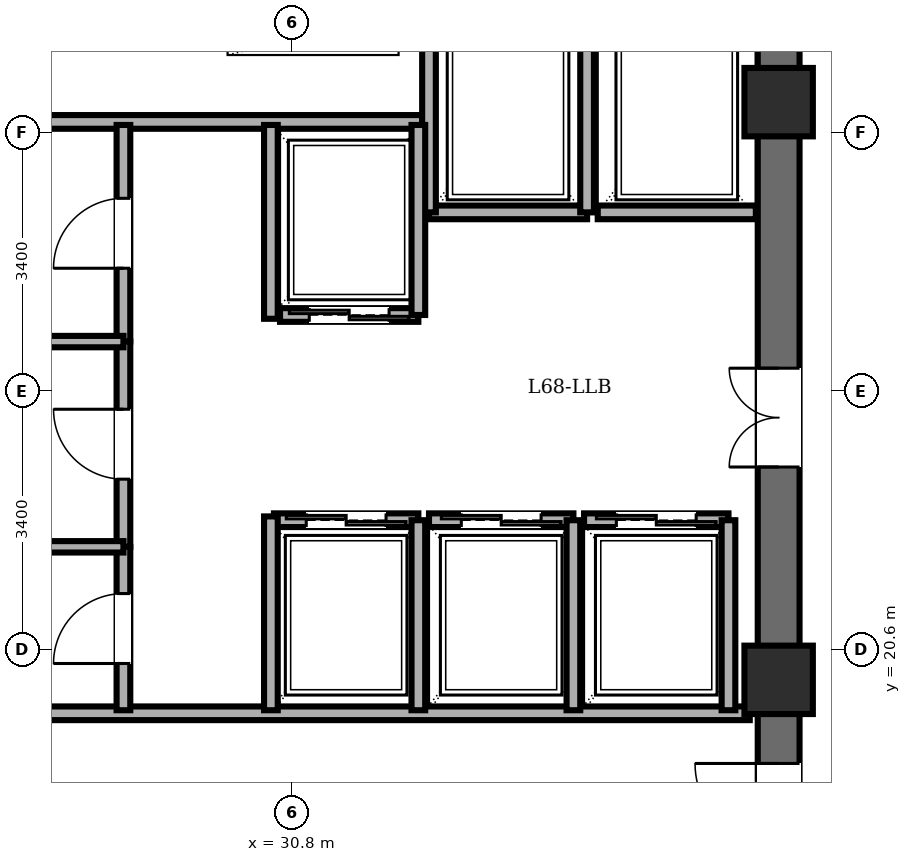
"""IFC4 building model, lengths in metres.
Left out: names, types, materials, properties, quantities, classifications, styles, units other than length and angle.
Written with IfcOpenShell. Run it as: python <this file> out.ifc"""

import sys

from ifc_helpers import new_model, si_unit, direction, frame, frame_2d, origin, origin_2d, place, context, subcontext, project, spatial, rectangle, extrude, element, fill, save


model = new_model("IFC4")
c1 = context("Model", 3, precision=1e-05, world=origin(), true_north=direction((0.0, 1.0)))
c2 = subcontext(c1, "Body", "Model", "MODEL_VIEW")
j1 = project(units=[si_unit("LENGTHUNIT", "METRE"), si_unit("PLANEANGLEUNIT", "RADIAN")], contexts=[c1])
p1 = place(None, origin())
s1 = spatial("IfcSite", under=j1, at=p1, CompositionType="ELEMENT")
p2 = place(p1, origin())
s2 = spatial("IfcBuilding", under=s1, at=p2, CompositionType="ELEMENT")
p3 = place(p2, frame((0.0, 0.0, 262.45)))
s3 = spatial("IfcBuildingStorey", under=s2, at=p3, CompositionType="ELEMENT", Elevation=262.45)
for number, where, z_axis, x_axis in (
    (1, (37.2, 20.2, 0.0), (0.0, 0.0, 1.0), (1.0, 0.0, 0.0)),
    (2, (37.2, 27.8, 0.0), (0.0, 0.0, 1.0), (1.0, 0.0, 0.0)),
):
    element("IfcColumn", number, at=place(p3, frame(where, z_axis=z_axis, x_axis=x_axis)), inside=s3, PredefinedType="COLUMN", context=c2, shape_type="SweptSolid", body=[
        extrude(rectangle(XDim=0.9, YDim=0.9, at=origin_2d()), origin(), (0.0, 0.0, 1.0), 3.65),
    ])
p4 = place(p3, frame((37.2, 14.4, 0.0), z_axis=(0.0, 0.0, 1.0), x_axis=(0.0, 1.0, 0.0)))
e3 = element("IfcWall", 3, at=p4, inside=s3, PredefinedType="SHEAR", context=c2, shape_type="SweptSolid", body=[
    extrude(rectangle(XDim=19.2, YDim=0.55, at=frame_2d((9.6, 0.0))), origin(), (0.0, 0.0, 1.0), 3.45),
])
p5 = place(p4, frame((15.8, 0.0, 0.0)))
e4 = element("IfcOpeningElement", 4, at=p5, cuts=e3, PredefinedType="OPENING", context=c2, shape_type="SweptSolid", body=[
    extrude(rectangle(XDim=1.15, YDim=2.15, at=frame_2d((0.575, 1.075))), frame((0.0, 0.285, 0.0), z_axis=(0.0, -1.0, 0.0), x_axis=(1.0, 0.0, 0.0)), (0.0, 0.0, 1.0), 0.57),
])
p6 = place(p4, frame((3.6, 0.0, 0.0)))
e5 = element("IfcOpeningElement", 5, at=p6, cuts=e3, PredefinedType="OPENING", context=c2, shape_type="SweptSolid", body=[
    extrude(rectangle(XDim=1.1, YDim=2.15, at=frame_2d((0.55, 1.075))), frame((0.0, 0.285, 0.0), z_axis=(0.0, -1.0, 0.0), x_axis=(1.0, 0.0, 0.0)), (0.0, 0.0, 1.0), 0.57),
])
p7 = place(p4, frame((8.6, 0.0, 0.0)))
e6 = element("IfcOpeningElement", 6, at=p7, cuts=e3, PredefinedType="OPENING", context=c2, shape_type="SweptSolid", body=[
    extrude(rectangle(XDim=1.3, YDim=2.2, at=frame_2d((0.65, 1.1))), frame((0.0, 0.285, 0.0), z_axis=(0.0, -1.0, 0.0), x_axis=(1.0, 0.0, 0.0)), (0.0, 0.0, 1.0), 0.57),
])
p8 = place(p3, frame((21.95, 27.54, 0.0), z_axis=(0.0, 0.0, 1.0), x_axis=(1.0, 0.0, 0.0)))
e7 = element("IfcWall", 7, at=p8, inside=s3, PredefinedType="PARTITIONING", context=c2, shape_type="SweptSolid", body=[
    extrude(rectangle(XDim=10.56, YDim=0.18, at=frame_2d((5.28, 0.0))), origin(), (0.0, 0.0, 1.0), 3.45),
])
p9 = place(p3, frame((21.95, 19.76, 0.0), z_axis=(0.0, 0.0, 1.0), x_axis=(1.0, 0.0, 0.0)))
e8 = element("IfcWall", 8, at=p9, inside=s3, PredefinedType="PARTITIONING", context=c2, shape_type="SweptSolid", body=[
    extrude(rectangle(XDim=14.87, YDim=0.18, at=frame_2d((7.435, 0.0))), origin(), (0.0, 0.0, 1.0), 3.45),
])
p10 = place(p3, frame((34.68, 26.35, 0.0), z_axis=(0.0, 0.0, 1.0), x_axis=(-1.0, 0.0, 0.0)))
e9 = element("IfcWall", 9, at=p10, inside=s3, PredefinedType="PARTITIONING", context=c2, shape_type="SweptSolid", body=[
    extrude(rectangle(XDim=2.08, YDim=0.18, at=frame_2d((1.04, 0.0))), origin(), (0.0, 0.0, 1.0), 3.45),
])
for number, where, z_axis, x_axis in (
    (10, (34.68, 26.35, 0.0), (0.0, 0.0, 1.0), (0.0, 1.0, 0.0)),
    (11, (32.6, 29.08, 0.0), (0.0, 0.0, 1.0), (0.0, -1.0, 0.0)),
):
    element("IfcWall", number, at=place(p3, frame(where, z_axis=z_axis, x_axis=x_axis)), inside=s3, PredefinedType="PARTITIONING", context=c2, shape_type="SweptSolid", body=[
        extrude(rectangle(XDim=2.73, YDim=0.18, at=frame_2d((1.365, 0.0))), origin(), (0.0, 0.0, 1.0), 3.45),
    ])
p11 = place(p3, frame((36.9, 26.35, 0.0), z_axis=(0.0, 0.0, 1.0), x_axis=(-1.0, 0.0, 0.0)))
e12 = element("IfcWall", 12, at=p11, inside=s3, PredefinedType="PARTITIONING", context=c2, shape_type="SweptSolid", body=[
    extrude(rectangle(XDim=2.08, YDim=0.18, at=frame_2d((1.04, 0.0))), origin(), (0.0, 0.0, 1.0), 3.45),
])
p12 = place(p3, frame((32.46, 25.0, 0.0), z_axis=(0.0, 0.0, 1.0), x_axis=(-1.0, 0.0, 0.0)))
e13 = element("IfcWall", 13, at=p12, inside=s3, PredefinedType="PARTITIONING", context=c2, shape_type="SweptSolid", body=[
    extrude(rectangle(XDim=1.82, YDim=0.18, at=frame_2d((0.91, 0.0))), origin(), (0.0, 0.0, 1.0), 3.45),
])
p13 = place(p12, frame((0.385, 0.0, 0.0)))
e14 = element("IfcOpeningElement", 14, at=p13, cuts=e13, PredefinedType="OPENING", context=c2, shape_type="SweptSolid", body=[
    extrude(rectangle(XDim=1.05, YDim=2.2, at=frame_2d((0.525, 1.1))), frame((0.0, 0.1, 0.0), z_axis=(0.0, -1.0, 0.0), x_axis=(1.0, 0.0, 0.0)), (0.0, 0.0, 1.0), 0.2),
])
p14 = place(p3, frame((32.46, 25.0, 0.0), z_axis=(0.0, 0.0, 1.0), x_axis=(0.0, 1.0, 0.0)))
e15 = element("IfcWall", 15, at=p14, inside=s3, PredefinedType="PARTITIONING", context=c2, shape_type="SweptSolid", body=[
    extrude(rectangle(XDim=2.5, YDim=0.18, at=frame_2d((1.25, 0.0))), origin(), (0.0, 0.0, 1.0), 3.45),
])
p15 = place(p3, frame((30.56, 22.3, 0.0), z_axis=(0.0, 0.0, 1.0), x_axis=(1.0, 0.0, 0.0)))
e16 = element("IfcWall", 16, at=p15, inside=s3, PredefinedType="PARTITIONING", context=c2, shape_type="SweptSolid", body=[
    extrude(rectangle(XDim=1.9, YDim=0.18, at=frame_2d((0.95, 0.0))), origin(), (0.0, 0.0, 1.0), 3.45),
])
p16 = place(p15, frame((0.425, 0.0, 0.0)))
e17 = element("IfcOpeningElement", 17, at=p16, cuts=e16, PredefinedType="OPENING", context=c2, shape_type="SweptSolid", body=[
    extrude(rectangle(XDim=1.05, YDim=2.2, at=frame_2d((0.525, 1.1))), frame((0.0, 0.1, 0.0), z_axis=(0.0, -1.0, 0.0), x_axis=(1.0, 0.0, 0.0)), (0.0, 0.0, 1.0), 0.2),
])
p17 = place(p3, frame((32.46, 19.8, 0.0), z_axis=(0.0, 0.0, 1.0), x_axis=(0.0, 1.0, 0.0)))
e18 = element("IfcWall", 18, at=p17, inside=s3, PredefinedType="PARTITIONING", context=c2, shape_type="SweptSolid", body=[
    extrude(rectangle(XDim=2.5, YDim=0.18, at=frame_2d((1.25, 0.0))), origin(), (0.0, 0.0, 1.0), 3.45),
])
p18 = place(p3, frame((32.6, 22.3, 0.0), z_axis=(0.0, 0.0, 1.0), x_axis=(1.0, 0.0, 0.0)))
e19 = element("IfcWall", 19, at=p18, inside=s3, PredefinedType="PARTITIONING", context=c2, shape_type="SweptSolid", body=[
    extrude(rectangle(XDim=1.9, YDim=0.18, at=frame_2d((0.95, 0.0))), origin(), (0.0, 0.0, 1.0), 3.45),
])
p19 = place(p18, frame((0.425, 0.0, 0.0)))
e20 = element("IfcOpeningElement", 20, at=p19, cuts=e19, PredefinedType="OPENING", context=c2, shape_type="SweptSolid", body=[
    extrude(rectangle(XDim=1.05, YDim=2.2, at=frame_2d((0.525, 1.1))), frame((0.0, 0.1, 0.0), z_axis=(0.0, -1.0, 0.0), x_axis=(1.0, 0.0, 0.0)), (0.0, 0.0, 1.0), 0.2),
])
p20 = place(p3, frame((34.5, 19.8, 0.0), z_axis=(0.0, 0.0, 1.0), x_axis=(0.0, 1.0, 0.0)))
e21 = element("IfcWall", 21, at=p20, inside=s3, PredefinedType="PARTITIONING", context=c2, shape_type="SweptSolid", body=[
    extrude(rectangle(XDim=2.5, YDim=0.18, at=frame_2d((1.25, 0.0))), origin(), (0.0, 0.0, 1.0), 3.45),
])
p21 = place(p3, frame((34.64, 22.3, 0.0), z_axis=(0.0, 0.0, 1.0), x_axis=(1.0, 0.0, 0.0)))
e22 = element("IfcWall", 22, at=p21, inside=s3, PredefinedType="PARTITIONING", context=c2, shape_type="SweptSolid", body=[
    extrude(rectangle(XDim=1.9, YDim=0.18, at=frame_2d((0.95, 0.0))), origin(), (0.0, 0.0, 1.0), 3.45),
])
p22 = place(p21, frame((0.425, 0.0, 0.0)))
e23 = element("IfcOpeningElement", 23, at=p22, cuts=e22, PredefinedType="OPENING", context=c2, shape_type="SweptSolid", body=[
    extrude(rectangle(XDim=1.05, YDim=2.2, at=frame_2d((0.525, 1.1))), frame((0.0, 0.1, 0.0), z_axis=(0.0, -1.0, 0.0), x_axis=(1.0, 0.0, 0.0)), (0.0, 0.0, 1.0), 0.2),
])
p23 = place(p3, frame((36.54, 19.8, 0.0), z_axis=(0.0, 0.0, 1.0), x_axis=(0.0, 1.0, 0.0)))
e24 = element("IfcWall", 24, at=p23, inside=s3, PredefinedType="PARTITIONING", context=c2, shape_type="SweptSolid", body=[
    extrude(rectangle(XDim=2.5, YDim=0.18, at=frame_2d((1.25, 0.0))), origin(), (0.0, 0.0, 1.0), 3.45),
])
for number, where, z_axis, x_axis in (
    (25, (30.52, 24.95, 0.0), (0.0, 0.0, 1.0), (0.0, 1.0, 0.0)),
    (26, (30.52, 19.8, 0.0), (0.0, 0.0, 1.0), (0.0, 1.0, 0.0)),
):
    element("IfcWall", number, at=place(p3, frame(where, z_axis=z_axis, x_axis=x_axis)), inside=s3, PredefinedType="PARTITIONING", context=c2, shape_type="SweptSolid", body=[
        extrude(rectangle(XDim=2.55, YDim=0.18, at=frame_2d((1.275, 0.0))), origin(), (0.0, 0.0, 1.0), 3.45),
    ])
p24 = place(p3, frame((28.58, 24.65, 0.0), z_axis=(0.0, 0.0, 1.0), x_axis=(0.0, 1.0, 0.0)))
e27 = element("IfcWall", 27, at=p24, inside=s3, PredefinedType="PARTITIONING", context=c2, shape_type="SweptSolid", body=[
    extrude(rectangle(XDim=2.85, YDim=0.18, at=frame_2d((1.425, 0.0))), origin(), (0.0, 0.0, 1.0), 3.45),
])
p25 = place(p24, frame((0.965, 0.0, 0.0)))
e28 = element("IfcOpeningElement", 28, at=p25, cuts=e27, PredefinedType="OPENING", context=c2, shape_type="SweptSolid", body=[
    extrude(rectangle(XDim=0.92, YDim=2.1, at=frame_2d((0.46, 1.05))), frame((0.0, 0.1, 0.0), z_axis=(0.0, -1.0, 0.0), x_axis=(1.0, 0.0, 0.0)), (0.0, 0.0, 1.0), 0.2),
])
p26 = place(p3, frame((28.58, 21.95, 0.0), z_axis=(0.0, 0.0, 1.0), x_axis=(0.0, 1.0, 0.0)))
e29 = element("IfcWall", 29, at=p26, inside=s3, PredefinedType="PARTITIONING", context=c2, shape_type="SweptSolid", body=[
    extrude(rectangle(XDim=2.7, YDim=0.18, at=frame_2d((1.35, 0.0))), origin(), (0.0, 0.0, 1.0), 3.45),
])
p27 = place(p26, frame((0.89, 0.0, 0.0)))
e30 = element("IfcOpeningElement", 30, at=p27, cuts=e29, PredefinedType="OPENING", context=c2, shape_type="SweptSolid", body=[
    extrude(rectangle(XDim=0.92, YDim=2.1, at=frame_2d((0.46, 1.05))), frame((0.0, 0.1, 0.0), z_axis=(0.0, -1.0, 0.0), x_axis=(1.0, 0.0, 0.0)), (0.0, 0.0, 1.0), 0.2),
])
p28 = place(p3, frame((28.58, 19.8, 0.0), z_axis=(0.0, 0.0, 1.0), x_axis=(0.0, 1.0, 0.0)))
e31 = element("IfcWall", 31, at=p28, inside=s3, PredefinedType="PARTITIONING", context=c2, shape_type="SweptSolid", body=[
    extrude(rectangle(XDim=2.15, YDim=0.18, at=frame_2d((1.075, 0.0))), origin(), (0.0, 0.0, 1.0), 3.45),
])
p29 = place(p28, frame((0.615, 0.0, 0.0)))
e32 = element("IfcOpeningElement", 32, at=p29, cuts=e31, PredefinedType="OPENING", context=c2, shape_type="SweptSolid", body=[
    extrude(rectangle(XDim=0.92, YDim=2.1, at=frame_2d((0.46, 1.05))), frame((0.0, 0.1, 0.0), z_axis=(0.0, -1.0, 0.0), x_axis=(1.0, 0.0, 0.0)), (0.0, 0.0, 1.0), 0.2),
])
for number, where, z_axis, x_axis in (
    (33, (21.95, 24.65, 0.0), (0.0, 0.0, 1.0), (1.0, 0.0, 0.0)),
    (34, (21.95, 21.95, 0.0), (0.0, 0.0, 1.0), (1.0, 0.0, 0.0)),
):
    element("IfcWall", number, at=place(p3, frame(where, z_axis=z_axis, x_axis=x_axis)), inside=s3, PredefinedType="PARTITIONING", context=c2, shape_type="SweptSolid", body=[
        extrude(rectangle(XDim=6.63, YDim=0.15, at=frame_2d((3.315, 0.0))), origin(), (0.0, 0.0, 1.0), 3.45),
    ])
p30 = place(p6, origin())
e35 = element("IfcDoor", 35, at=p30, inside=s3, OperationType="SINGLE_SWING_RIGHT", PredefinedType="DOOR", context=c2, shape_type="SweptSolid", body=[
    extrude(rectangle(XDim=1.1, YDim=2.15, at=frame_2d((0.55, 1.075))), frame((0.0, 0.025, 0.0), z_axis=(0.0, -1.0, 0.0), x_axis=(1.0, 0.0, 0.0)), (0.0, 0.0, 1.0), 0.05),
])
fill(e5, e35)
p31 = place(p13, origin())
e36 = element("IfcDoor", 36, at=p31, inside=s3, OperationType="DOUBLE_DOOR_SLIDING", PredefinedType="DOOR", context=c2, shape_type="SweptSolid", body=[
    extrude(rectangle(XDim=1.05, YDim=2.2, at=frame_2d((0.525, 1.1))), frame((0.0, 0.025, 0.0), z_axis=(0.0, -1.0, 0.0), x_axis=(1.0, 0.0, 0.0)), (0.0, 0.0, 1.0), 0.05),
])
fill(e14, e36)
p32 = place(p16, origin())
e37 = element("IfcDoor", 37, at=p32, inside=s3, OperationType="DOUBLE_DOOR_SLIDING", PredefinedType="DOOR", context=c2, shape_type="SweptSolid", body=[
    extrude(rectangle(XDim=1.05, YDim=2.2, at=frame_2d((0.525, 1.1))), frame((0.0, 0.025, 0.0), z_axis=(0.0, -1.0, 0.0), x_axis=(1.0, 0.0, 0.0)), (0.0, 0.0, 1.0), 0.05),
])
fill(e17, e37)
p33 = place(p19, origin())
e38 = element("IfcDoor", 38, at=p33, inside=s3, OperationType="DOUBLE_DOOR_SLIDING", PredefinedType="DOOR", context=c2, shape_type="SweptSolid", body=[
    extrude(rectangle(XDim=1.05, YDim=2.2, at=frame_2d((0.525, 1.1))), frame((0.0, 0.025, 0.0), z_axis=(0.0, -1.0, 0.0), x_axis=(1.0, 0.0, 0.0)), (0.0, 0.0, 1.0), 0.05),
])
fill(e20, e38)
p34 = place(p22, origin())
e39 = element("IfcDoor", 39, at=p34, inside=s3, OperationType="DOUBLE_DOOR_SLIDING", PredefinedType="DOOR", context=c2, shape_type="SweptSolid", body=[
    extrude(rectangle(XDim=1.05, YDim=2.2, at=frame_2d((0.525, 1.1))), frame((0.0, 0.025, 0.0), z_axis=(0.0, -1.0, 0.0), x_axis=(1.0, 0.0, 0.0)), (0.0, 0.0, 1.0), 0.05),
])
fill(e23, e39)
p35 = place(p25, origin())
e40 = element("IfcDoor", 40, at=p35, inside=s3, OperationType="SINGLE_SWING_LEFT", PredefinedType="DOOR", context=c2, shape_type="SweptSolid", body=[
    extrude(rectangle(XDim=0.92, YDim=2.1, at=frame_2d((0.46, 1.05))), frame((0.0, 0.025, 0.0), z_axis=(0.0, -1.0, 0.0), x_axis=(1.0, 0.0, 0.0)), (0.0, 0.0, 1.0), 0.05),
])
fill(e28, e40)
p36 = place(p27, origin())
e41 = element("IfcDoor", 41, at=p36, inside=s3, OperationType="SINGLE_SWING_RIGHT", PredefinedType="DOOR", context=c2, shape_type="SweptSolid", body=[
    extrude(rectangle(XDim=0.92, YDim=2.1, at=frame_2d((0.46, 1.05))), frame((0.0, 0.025, 0.0), z_axis=(0.0, -1.0, 0.0), x_axis=(1.0, 0.0, 0.0)), (0.0, 0.0, 1.0), 0.05),
])
fill(e30, e41)
p37 = place(p29, origin())
e42 = element("IfcDoor", 42, at=p37, inside=s3, OperationType="SINGLE_SWING_LEFT", PredefinedType="DOOR", context=c2, shape_type="SweptSolid", body=[
    extrude(rectangle(XDim=0.92, YDim=2.1, at=frame_2d((0.46, 1.05))), frame((0.0, 0.025, 0.0), z_axis=(0.0, -1.0, 0.0), x_axis=(1.0, 0.0, 0.0)), (0.0, 0.0, 1.0), 0.05),
])
fill(e32, e42)
p38 = place(p7, origin())
e43 = element("IfcDoor", 43, at=p38, inside=s3, OperationType="DOUBLE_DOOR_SINGLE_SWING", PredefinedType="DOOR", context=c2, shape_type="SweptSolid", body=[
    extrude(rectangle(XDim=1.3, YDim=2.2, at=frame_2d((0.65, 1.1))), frame((0.0, 0.025, 0.0), z_axis=(0.0, -1.0, 0.0), x_axis=(1.0, 0.0, 0.0)), (0.0, 0.0, 1.0), 0.05),
])
fill(e6, e43)
save(model, sys.argv[1])
